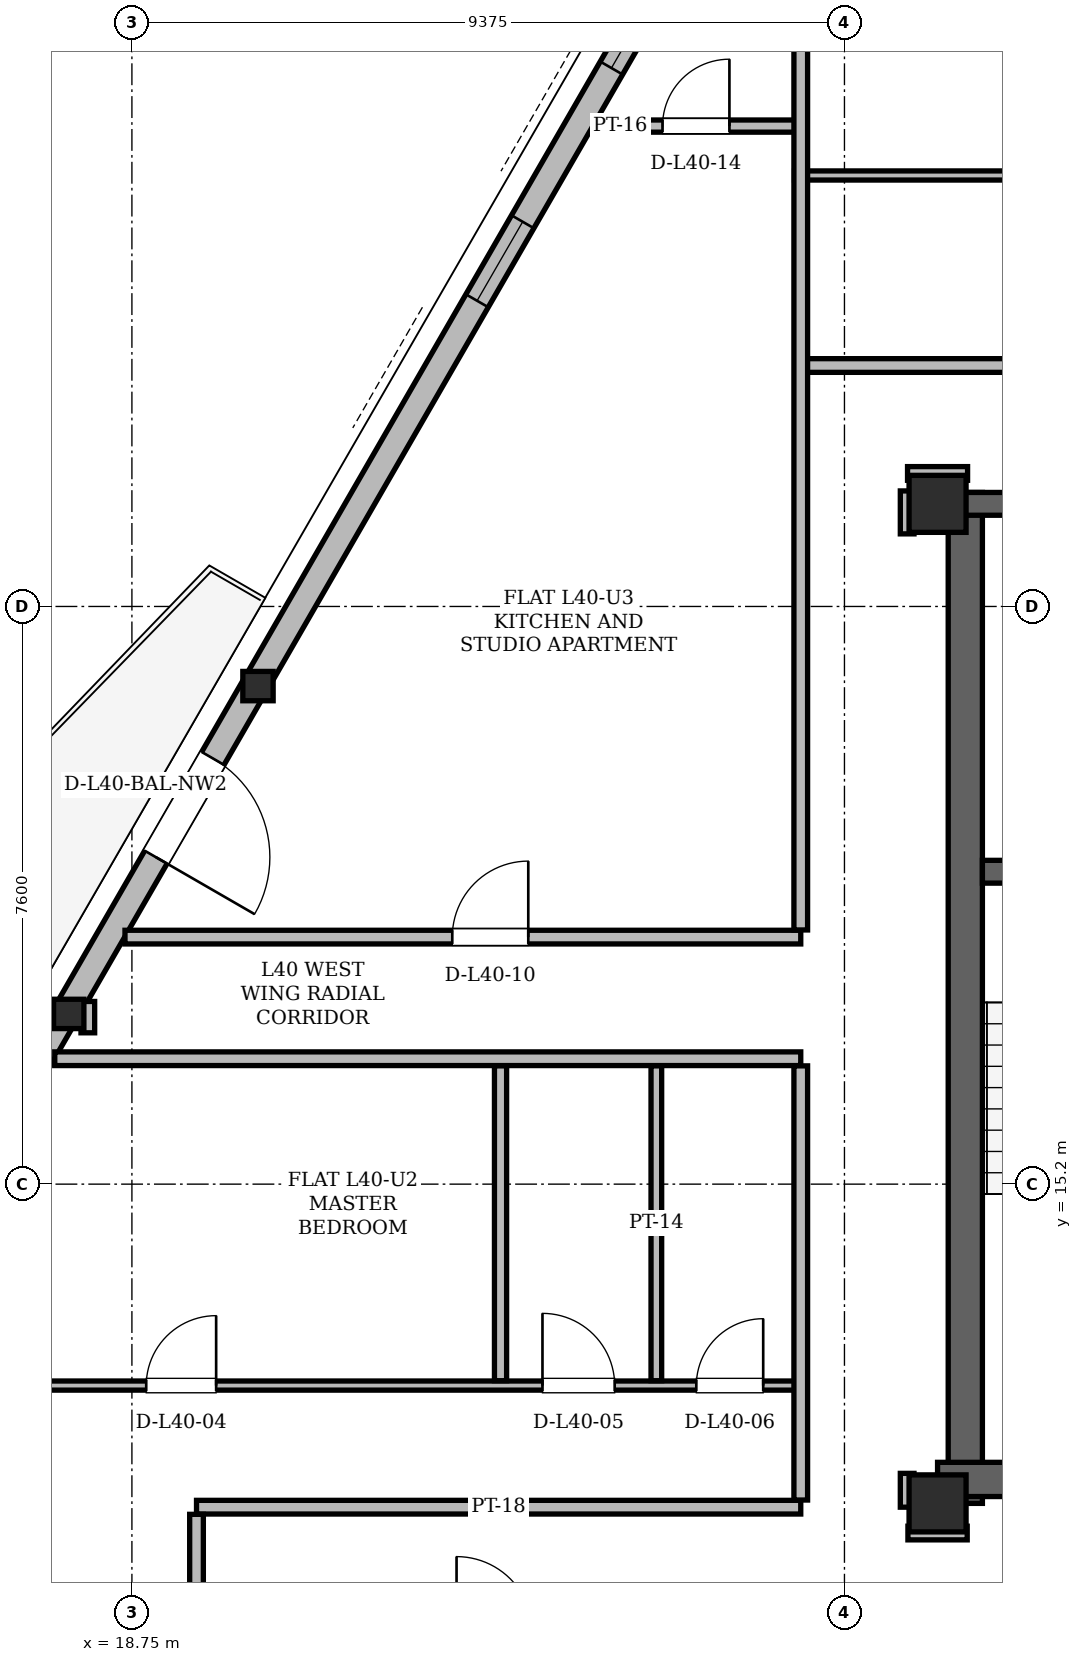
"""IFC4 building model, lengths in metres.
Left out: names, types, materials, properties, quantities, classifications, styles, units other than length and angle.
Written with IfcOpenShell. Run it as: python <this file> out.ifc"""

import sys

from ifc_helpers import new_model, si_unit, direction, frame, frame_2d, origin, origin_2d, place, context, subcontext, project, spatial, rectangle, hollow_rectangle, i_section, extrude, element, fill, save


model = new_model("IFC4")
c1 = context("Model", 3, precision=1e-05, world=origin(), true_north=direction((0.0, 1.0)))
c2 = subcontext(c1, "Body", "Model", "MODEL_VIEW")
j1 = project(units=[si_unit("LENGTHUNIT", "METRE"), si_unit("PLANEANGLEUNIT", "RADIAN")], contexts=[c1])
p1 = place(None, origin())
s1 = spatial("IfcSite", under=j1, at=p1, CompositionType="ELEMENT")
p2 = place(p1, origin())
s2 = spatial("IfcBuilding", under=s1, at=p2, CompositionType="ELEMENT")
p3 = place(p2, frame((0.0, 0.0, 153.0)))
s3 = spatial("IfcBuildingStorey", under=s2, at=p3, CompositionType="ELEMENT", Elevation=153.0)
for number, where, z_axis, x_axis in (
    (1, (29.35, 11.0, 0.0), (0.0, 0.0, 1.0), (1.0, 0.0, 0.0)),
    (2, (29.35, 24.15, 0.0), (0.0, 0.0, 1.0), (1.0, 0.0, 0.0)),
):
    element("IfcColumn", number, at=place(p3, frame(where, z_axis=z_axis, x_axis=x_axis)), inside=s3, PredefinedType="COLUMN", context=c2, shape_type="SweptSolid", body=[
        extrude(hollow_rectangle(XDim=0.75, YDim=0.75, WallThickness=0.06, at=origin_2d()), origin(), (0.0, 0.0, 1.0), 3.6),
    ])
p4 = place(p3, frame((20.379, 21.777, 0.004), z_axis=(0.016652541963, -0.013933759602, 0.999764243804), x_axis=(0.641722632674, 0.766936804903, 0.0)))
e3 = element("IfcColumn", 3, at=p4, inside=s3, PredefinedType="COLUMN", context=c2, shape_type="SweptSolid", body=[
    extrude(i_section(OverallWidth=0.399, OverallDepth=0.386, WebThickness=0.021, FlangeThickness=0.033, at=origin_2d()), origin(), (0.0, 0.0, 1.0), 3.592),
])
p5 = place(p3, frame((17.891, 17.469, 0.004), z_axis=(0.015360919156, -0.016176543182, 0.999751149843), x_axis=(0.725151558483, 0.68858929503, 0.0)))
e4 = element("IfcColumn", 4, at=p5, inside=s3, PredefinedType="COLUMN", context=c2, shape_type="SweptSolid", body=[
    extrude(i_section(OverallWidth=0.399, OverallDepth=0.386, WebThickness=0.021, FlangeThickness=0.033, at=origin_2d()), origin(), (0.0, 0.0, 1.0), 3.592),
])
p6 = place(p3, frame((29.715, 11.0, 0.0), z_axis=(0.0, 0.0, 1.0), x_axis=(0.0, 1.0, 0.0)))
e5 = element("IfcWall", 5, at=p6, inside=s3, PredefinedType="SHEAR", context=c2, shape_type="SweptSolid", body=[
    extrude(rectangle(XDim=13.3, YDim=0.45, at=frame_2d((6.65, 0.0))), origin(), (0.0, 0.0, 1.0), 3.38),
])
p7 = place(p3, frame((29.35, 11.315, 0.0), z_axis=(0.0, 0.0, 1.0), x_axis=(1.0, 0.0, 0.0)))
e6 = element("IfcWall", 6, at=p7, inside=s3, PredefinedType="SHEAR", context=c2, shape_type="SweptSolid", body=[
    extrude(rectangle(XDim=7.1, YDim=0.45, at=frame_2d((3.55, 0.0))), origin(), (0.0, 0.0, 1.0), 3.38),
])
p8 = place(p3, frame((29.65, 24.15, 0.0), z_axis=(0.0, 0.0, 1.0), x_axis=(1.0, 0.0, 0.0)))
e7 = element("IfcWall", 7, at=p8, inside=s3, PredefinedType="SHEAR", context=c2, shape_type="SweptSolid", body=[
    extrude(rectangle(XDim=15.7, YDim=0.3, at=frame_2d((7.85, 0.0))), origin(), (0.0, 0.0, 1.0), 3.38),
])
p9 = place(p8, frame((1.7, 0.0, 0.0)))
e8 = element("IfcOpeningElement", 8, at=p9, cuts=e7, PredefinedType="OPENING", context=c2, shape_type="SweptSolid", body=[
    extrude(rectangle(XDim=1.2, YDim=2.2, at=frame_2d((0.6, 1.1))), frame((0.0, 0.15, 0.0), z_axis=(0.0, -1.0, 0.0), x_axis=(1.0, 0.0, 0.0)), (0.0, 0.0, 1.0), 0.3),
])
p10 = place(p8, frame((12.8, 0.0, 0.0)))
e9 = element("IfcOpeningElement", 9, at=p10, cuts=e7, PredefinedType="OPENING", context=c2, shape_type="SweptSolid", body=[
    extrude(rectangle(XDim=1.2, YDim=2.2, at=frame_2d((0.6, 1.1))), frame((0.0, 0.15, 0.0), z_axis=(0.0, -1.0, 0.0), x_axis=(1.0, 0.0, 0.0)), (0.0, 0.0, 1.0), 0.3),
])
p11 = place(p8, frame((6.55, 0.0, 0.0)))
e10 = element("IfcOpeningElement", 10, at=p11, cuts=e7, PredefinedType="OPENING", context=c2, shape_type="SweptSolid", body=[
    extrude(rectangle(XDim=0.9, YDim=2.05, at=frame_2d((0.45, 1.025))), frame((0.0, 0.15, 0.0), z_axis=(0.0, -1.0, 0.0), x_axis=(1.0, 0.0, 0.0)), (0.0, 0.0, 1.0), 0.3),
])
p12 = place(p8, frame((8.45, 0.0, 0.0)))
e11 = element("IfcOpeningElement", 11, at=p12, cuts=e7, PredefinedType="OPENING", context=c2, shape_type="SweptSolid", body=[
    extrude(rectangle(XDim=0.9, YDim=2.05, at=frame_2d((0.45, 1.025))), frame((0.0, 0.15, 0.0), z_axis=(0.0, -1.0, 0.0), x_axis=(1.0, 0.0, 0.0)), (0.0, 0.0, 1.0), 0.3),
])
p13 = place(p3, frame((29.94, 19.31, 0.0), z_axis=(0.0, 0.0, 1.0), x_axis=(1.0, 0.0, 0.0)))
e12 = element("IfcWall", 12, at=p13, inside=s3, PredefinedType="SHEAR", context=c2, shape_type="SweptSolid", body=[
    extrude(rectangle(XDim=4.01, YDim=0.3, at=frame_2d((2.005, 0.0))), origin(), (0.0, 0.0, 1.0), 3.38),
])
p14 = place(p13, frame((1.01, 0.0, 0.0)))
e13 = element("IfcOpeningElement", 13, at=p14, cuts=e12, PredefinedType="OPENING", context=c2, shape_type="SweptSolid", body=[
    extrude(rectangle(XDim=1.4, YDim=2.2, at=frame_2d((0.7, 1.1))), frame((0.0, 0.15, 0.0), z_axis=(0.0, -1.0, 0.0), x_axis=(1.0, 0.0, 0.0)), (0.0, 0.0, 1.0), 0.3),
])
p15 = place(p3, frame((15.048, 12.544, 0.0), z_axis=(0.0, 0.0, 1.0), x_axis=(0.499991763293, -0.866030159197, 0.0)))
e14 = element("IfcWall", 14, at=p15, inside=s3, PredefinedType="SOLIDWALL", context=c2, shape_type="SweptSolid", body=[
    extrude(rectangle(XDim=9.365, YDim=0.34, at=frame_2d((4.682, 0.0))), origin(), (0.0, 0.0, 1.0), 2.6),
])
p16 = place(p3, frame((32.818, 43.322, 0.0), z_axis=(0.0, 0.0, 1.0), x_axis=(-0.500000946011, -0.866024857604, 0.0)))
e15 = element("IfcWall", 15, at=p16, inside=s3, PredefinedType="SOLIDWALL", context=c2, shape_type="SweptSolid", body=[
    extrude(rectangle(XDim=35.54, YDim=0.34, at=frame_2d((17.77, 0.0))), origin(), (0.0, 0.0, 1.0), 2.6),
])
p17 = place(p16, frame((6.579, 0.0, 0.0)))
e16 = element("IfcOpeningElement", 16, at=p17, cuts=e15, PredefinedType="OPENING", context=c2, shape_type="SweptSolid", body=[
    extrude(rectangle(XDim=1.5, YDim=2.2, at=frame_2d((0.75, 1.1))), frame((0.0, 0.17, 0.0), z_axis=(0.0, -1.0, 0.0), x_axis=(1.0, 0.0, 0.0)), (0.0, 0.0, 1.0), 0.34),
])
p18 = place(p16, frame((26.005, 0.0, 0.0)))
e17 = element("IfcOpeningElement", 17, at=p18, cuts=e15, PredefinedType="OPENING", context=c2, shape_type="SweptSolid", body=[
    extrude(rectangle(XDim=1.5, YDim=2.2, at=frame_2d((0.75, 1.1))), frame((0.0, 0.17, 0.0), z_axis=(0.0, -1.0, 0.0), x_axis=(1.0, 0.0, 0.0)), (0.0, 0.0, 1.0), 0.34),
])
p19 = place(p16, frame((33.049, 0.0, 0.85)))
e18 = element("IfcOpeningElement", 18, at=p19, cuts=e15, PredefinedType="OPENING", context=c2, shape_type="SweptSolid", body=[
    extrude(rectangle(XDim=1.2, YDim=1.48, at=frame_2d((0.6, 0.74))), frame((0.0, 0.17, 0.0), z_axis=(0.0, -1.0, 0.0), x_axis=(1.0, 0.0, 0.0)), (0.0, 0.0, 1.0), 0.34),
])
p20 = place(p16, frame((17.853, 0.0, 0.85)))
e19 = element("IfcOpeningElement", 19, at=p20, cuts=e15, PredefinedType="OPENING", context=c2, shape_type="SweptSolid", body=[
    extrude(rectangle(XDim=1.2, YDim=1.48, at=frame_2d((0.6, 0.74))), frame((0.0, 0.17, 0.0), z_axis=(0.0, -1.0, 0.0), x_axis=(1.0, 0.0, 0.0)), (0.0, 0.0, 1.0), 0.34),
])
p21 = place(p16, frame((11.661, 0.0, 0.85)))
e20 = element("IfcOpeningElement", 20, at=p21, cuts=e15, PredefinedType="OPENING", context=c2, shape_type="SweptSolid", body=[
    extrude(rectangle(XDim=1.2, YDim=1.48, at=frame_2d((0.6, 0.74))), frame((0.0, 0.17, 0.0), z_axis=(0.0, -1.0, 0.0), x_axis=(1.0, 0.0, 0.0)), (0.0, 0.0, 1.0), 0.34),
])
p22 = place(p16, frame((14.317, 0.0, 0.85)))
e21 = element("IfcOpeningElement", 21, at=p22, cuts=e15, PredefinedType="OPENING", context=c2, shape_type="SweptSolid", body=[
    extrude(rectangle(XDim=1.2, YDim=1.48, at=frame_2d((0.6, 0.74))), frame((0.0, 0.17, 0.0), z_axis=(0.0, -1.0, 0.0), x_axis=(1.0, 0.0, 0.0)), (0.0, 0.0, 1.0), 0.34),
])
p23 = place(p16, frame((2.865, 0.0, 0.85)))
e22 = element("IfcOpeningElement", 22, at=p23, cuts=e15, PredefinedType="OPENING", context=c2, shape_type="SweptSolid", body=[
    extrude(rectangle(XDim=1.6, YDim=1.64, at=frame_2d((0.8, 0.82))), frame((0.0, 0.17, 0.0), z_axis=(0.0, -1.0, 0.0), x_axis=(1.0, 0.0, 0.0)), (0.0, 0.0, 1.0), 0.34),
])
p24 = place(p3, frame((28.96, 10.61, 0.0), z_axis=(0.0, 0.0, 1.0), x_axis=(1.0, 0.0, 0.0)))
e23 = element("IfcWall", 23, at=p24, inside=s3, PredefinedType="PARTITIONING", context=c2, shape_type="SweptSolid", body=[
    extrude(rectangle(XDim=0.78, YDim=0.18, at=frame_2d((0.39, 0.0))), origin(), (0.0, 0.0, 1.0), 3.38),
])
p25 = place(p3, frame((19.6, 10.95, 0.0), z_axis=(0.0, 0.0, 1.0), x_axis=(1.0, 0.0, 0.0)))
e24 = element("IfcWall", 24, at=p25, inside=s3, PredefinedType="PARTITIONING", context=c2, shape_type="SweptSolid", body=[
    extrude(rectangle(XDim=7.95, YDim=0.18, at=frame_2d((3.975, 0.0))), origin(), (0.0, 0.0, 1.0), 3.38),
])
p26 = place(p3, frame((15.438, 12.55, 0.0), z_axis=(0.0, 0.0, 1.0), x_axis=(1.0, 0.0, 0.0)))
e25 = element("IfcWall", 25, at=p26, inside=s3, PredefinedType="PARTITIONING", context=c2, shape_type="SweptSolid", body=[
    extrude(rectangle(XDim=12.162, YDim=0.12, at=frame_2d((6.081, 0.0))), origin(), (0.0, 0.0, 1.0), 3.38),
])
p27 = place(p26, frame((3.5, 0.0, 0.0)))
e26 = element("IfcOpeningElement", 26, at=p27, cuts=e25, PredefinedType="OPENING", context=c2, shape_type="SweptSolid", body=[
    extrude(rectangle(XDim=0.92, YDim=2.12, at=frame_2d((0.46, 1.06))), frame((0.0, 0.06, 0.0), z_axis=(0.0, -1.0, 0.0), x_axis=(1.0, 0.0, 0.0)), (0.0, 0.0, 1.0), 0.12),
])
p28 = place(p26, frame((8.714, 0.0, 0.0)))
e27 = element("IfcOpeningElement", 27, at=p28, cuts=e25, PredefinedType="OPENING", context=c2, shape_type="SweptSolid", body=[
    extrude(rectangle(XDim=0.95, YDim=2.1, at=frame_2d((0.475, 1.05))), frame((0.0, 0.06, 0.0), z_axis=(0.0, -1.0, 0.0), x_axis=(1.0, 0.0, 0.0)), (0.0, 0.0, 1.0), 0.12),
])
p29 = place(p26, frame((10.738, 0.0, 0.0)))
e28 = element("IfcOpeningElement", 28, at=p29, cuts=e25, PredefinedType="OPENING", context=c2, shape_type="SweptSolid", body=[
    extrude(rectangle(XDim=0.88, YDim=2.08, at=frame_2d((0.44, 1.04))), frame((0.0, 0.06, 0.0), z_axis=(0.0, -1.0, 0.0), x_axis=(1.0, 0.0, 0.0)), (0.0, 0.0, 1.0), 0.12),
])
p30 = place(p3, frame((17.735, 16.85, 0.0), z_axis=(0.0, 0.0, 1.0), x_axis=(1.0, 0.0, 0.0)))
e29 = element("IfcWall", 29, at=p30, inside=s3, PredefinedType="PARTITIONING", context=c2, shape_type="SweptSolid", body=[
    extrude(rectangle(XDim=9.815, YDim=0.18, at=frame_2d((4.907, 0.0))), origin(), (0.0, 0.0, 1.0), 3.38),
])
p31 = place(p3, frame((18.659, 18.45, 0.0), z_axis=(0.0, 0.0, 1.0), x_axis=(1.0, 0.0, 0.0)))
e30 = element("IfcWall", 30, at=p31, inside=s3, PredefinedType="PARTITIONING", context=c2, shape_type="SweptSolid", body=[
    extrude(rectangle(XDim=8.891, YDim=0.18, at=frame_2d((4.446, 0.0))), origin(), (0.0, 0.0, 1.0), 3.38),
])
p32 = place(p31, frame((4.306, 0.0, 0.0)))
e31 = element("IfcOpeningElement", 31, at=p32, cuts=e30, PredefinedType="OPENING", context=c2, shape_type="SweptSolid", body=[
    extrude(rectangle(XDim=1.0, YDim=2.18, at=frame_2d((0.5, 1.09))), frame((0.0, 0.09, 0.0), z_axis=(0.0, -1.0, 0.0), x_axis=(1.0, 0.0, 0.0)), (0.0, 0.0, 1.0), 0.18),
])
p33 = place(p3, frame((28.955, 24.55, 0.0), z_axis=(0.0, 0.0, 1.0), x_axis=(1.0, 0.0, 0.0)))
e32 = element("IfcWall", 32, at=p33, inside=s3, PredefinedType="PARTITIONING", context=c2, shape_type="SweptSolid", body=[
    extrude(rectangle(XDim=0.79, YDim=0.18, at=frame_2d((0.395, 0.0))), origin(), (0.0, 0.0, 1.0), 2.842),
])
p34 = place(p3, frame((27.55, 25.97, 0.0), z_axis=(0.0, 0.0, 1.0), x_axis=(1.0, 0.0, 0.0)))
e33 = element("IfcWall", 33, at=p34, inside=s3, PredefinedType="PARTITIONING", context=c2, shape_type="SweptSolid", body=[
    extrude(rectangle(XDim=9.15, YDim=0.18, at=frame_2d((4.575, 0.0))), origin(), (0.0, 0.0, 1.0), 2.842),
])
p35 = place(p3, frame((27.468, 28.47, 0.0), z_axis=(0.0, 0.0, 1.0), x_axis=(1.0, 0.0, 0.0)))
e34 = element("IfcWall", 34, at=p35, inside=s3, PredefinedType="PARTITIONING", context=c2, shape_type="SweptSolid", body=[
    extrude(rectangle(XDim=9.314, YDim=0.12, at=frame_2d((4.657, 0.0))), origin(), (0.0, 0.0, 1.0), 3.38),
])
p36 = place(p35, frame((4.217, 0.0, 0.0)))
e35 = element("IfcOpeningElement", 35, at=p36, cuts=e34, PredefinedType="OPENING", context=c2, shape_type="SweptSolid", body=[
    extrude(rectangle(XDim=0.88, YDim=2.08, at=frame_2d((0.44, 1.04))), frame((0.0, 0.06, 0.0), z_axis=(0.0, -1.0, 0.0), x_axis=(1.0, 0.0, 0.0)), (0.0, 0.0, 1.0), 0.12),
])
p37 = place(p3, frame((24.819, 29.12, 0.0), z_axis=(0.0, 0.0, 1.0), x_axis=(1.0, 0.0, 0.0)))
e36 = element("IfcWall", 36, at=p37, inside=s3, PredefinedType="PARTITIONING", context=c2, shape_type="SweptSolid", body=[
    extrude(rectangle(XDim=2.813, YDim=0.16, at=frame_2d((1.406, 0.0))), origin(), (0.0, 0.0, 1.0), 3.38),
])
p38 = place(p37, frame((0.912, 0.0, 0.0)))
e37 = element("IfcOpeningElement", 37, at=p38, cuts=e36, PredefinedType="OPENING", context=c2, shape_type="SweptSolid", body=[
    extrude(rectangle(XDim=0.88, YDim=2.08, at=frame_2d((0.44, 1.04))), frame((0.0, 0.08, 0.0), z_axis=(0.0, -1.0, 0.0), x_axis=(1.0, 0.0, 0.0)), (0.0, 0.0, 1.0), 0.16),
])
p39 = place(p3, frame((18.17, 17.191, 0.0), z_axis=(0.0, 0.0, 1.0), x_axis=(0.0, 1.0, 0.0)))
e38 = element("IfcWall", 38, at=p39, inside=s3, PredefinedType="PARTITIONING", context=c2, shape_type="SweptSolid", body=[
    extrude(rectangle(XDim=0.413, YDim=0.18, at=frame_2d((0.206, 0.0))), origin(), (0.0, 0.0, 1.0), 3.38),
])
p40 = place(p3, frame((19.6, 9.394, 0.0), z_axis=(0.0, 0.0, 1.0), x_axis=(0.0, 1.0, 0.0)))
e39 = element("IfcWall", 39, at=p40, inside=s3, PredefinedType="PARTITIONING", context=c2, shape_type="SweptSolid", body=[
    extrude(rectangle(XDim=1.462, YDim=0.18, at=frame_2d((0.731, 0.0))), origin(), (0.0, 0.0, 1.0), 3.38),
])
p41 = place(p3, frame((23.6, 12.614, 0.0), z_axis=(0.0, 0.0, 1.0), x_axis=(0.0, 1.0, 0.0)))
e40 = element("IfcWall", 40, at=p41, inside=s3, PredefinedType="PARTITIONING", context=c2, shape_type="SweptSolid", body=[
    extrude(rectangle(XDim=4.142, YDim=0.16, at=frame_2d((2.071, 0.0))), origin(), (0.0, 0.0, 1.0), 3.38),
])
p42 = place(p3, frame((25.65, 12.614, 0.0), z_axis=(0.0, 0.0, 1.0), x_axis=(0.0, 1.0, 0.0)))
e41 = element("IfcWall", 41, at=p42, inside=s3, PredefinedType="PARTITIONING", context=c2, shape_type="SweptSolid", body=[
    extrude(rectangle(XDim=4.142, YDim=0.14, at=frame_2d((2.071, 0.0))), origin(), (0.0, 0.0, 1.0), 3.38),
])
p43 = place(p3, frame((27.55, 11.044, 0.0), z_axis=(0.0, 0.0, 1.0), x_axis=(0.0, 1.0, 0.0)))
e42 = element("IfcWall", 42, at=p43, inside=s3, PredefinedType="PARTITIONING", context=c2, shape_type="SweptSolid", body=[
    extrude(rectangle(XDim=5.712, YDim=0.18, at=frame_2d((2.856, 0.0))), origin(), (0.0, 0.0, 1.0), 2.842),
])
p44 = place(p3, frame((27.55, 18.544, 0.0), z_axis=(0.0, 0.0, 1.0), x_axis=(0.0, 1.0, 0.0)))
e43 = element("IfcWall", 43, at=p44, inside=s3, PredefinedType="PARTITIONING", context=c2, shape_type="SweptSolid", body=[
    extrude(rectangle(XDim=15.306, YDim=0.18, at=frame_2d((7.653, 0.0))), origin(), (0.0, 0.0, 1.0), 3.38),
])
p45 = place(p3, frame((28.95, 10.95, 0.0), z_axis=(0.0, 0.0, 1.0), x_axis=(0.0, 1.0, 0.0)))
e44 = element("IfcWall", 44, at=p45, inside=s3, PredefinedType="PARTITIONING", context=c2, shape_type="SweptSolid", body=[
    extrude(rectangle(XDim=0.445, YDim=0.18, at=frame_2d((0.223, 0.0))), origin(), (0.0, 0.0, 1.0), 2.842),
])
p46 = place(p3, frame((28.95, 23.755, 0.0), z_axis=(0.0, 0.0, 1.0), x_axis=(0.0, 1.0, 0.0)))
e45 = element("IfcWall", 45, at=p46, inside=s3, PredefinedType="PARTITIONING", context=c2, shape_type="SweptSolid", body=[
    extrude(rectangle(XDim=0.565, YDim=0.18, at=frame_2d((0.283, 0.0))), origin(), (0.0, 0.0, 1.0), 3.38),
])
p47 = place(p18, origin())
e46 = element("IfcDoor", 46, at=p47, inside=s3, OperationType="SINGLE_SWING_RIGHT", PredefinedType="DOOR", context=c2, shape_type="SweptSolid", body=[
    extrude(rectangle(XDim=1.5, YDim=2.2, at=frame_2d((0.75, 1.1))), frame((0.0, 0.025, 0.0), z_axis=(0.0, -1.0, 0.0), x_axis=(1.0, 0.0, 0.0)), (0.0, 0.0, 1.0), 0.05),
])
fill(e17, e46)
p48 = place(p20, origin())
e47 = element("IfcWindow", 47, at=p48, inside=s3, PartitioningType="SINGLE_PANEL", PredefinedType="WINDOW", context=c2, shape_type="SweptSolid", body=[
    extrude(rectangle(XDim=1.2, YDim=1.48, at=frame_2d((0.6, 0.74))), frame((0.0, 0.03, 0.0), z_axis=(0.0, -1.0, 0.0), x_axis=(1.0, 0.0, 0.0)), (0.0, 0.0, 1.0), 0.06),
])
fill(e19, e47)
p49 = place(p22, origin())
e48 = element("IfcWindow", 48, at=p49, inside=s3, PartitioningType="SINGLE_PANEL", PredefinedType="WINDOW", context=c2, shape_type="SweptSolid", body=[
    extrude(rectangle(XDim=1.2, YDim=1.48, at=frame_2d((0.6, 0.74))), frame((0.0, 0.03, 0.0), z_axis=(0.0, -1.0, 0.0), x_axis=(1.0, 0.0, 0.0)), (0.0, 0.0, 1.0), 0.06),
])
fill(e21, e48)
p50 = place(p27, origin())
e49 = element("IfcDoor", 49, at=p50, inside=s3, OperationType="SINGLE_SWING_RIGHT", PredefinedType="DOOR", context=c2, shape_type="SweptSolid", body=[
    extrude(rectangle(XDim=0.92, YDim=2.12, at=frame_2d((0.46, 1.06))), frame((0.0, 0.025, 0.0), z_axis=(0.0, -1.0, 0.0), x_axis=(1.0, 0.0, 0.0)), (0.0, 0.0, 1.0), 0.05),
])
fill(e26, e49)
p51 = place(p28, origin())
e50 = element("IfcDoor", 50, at=p51, inside=s3, OperationType="SINGLE_SWING_LEFT", PredefinedType="DOOR", context=c2, shape_type="SweptSolid", body=[
    extrude(rectangle(XDim=0.95, YDim=2.1, at=frame_2d((0.475, 1.05))), frame((0.0, 0.025, 0.0), z_axis=(0.0, -1.0, 0.0), x_axis=(1.0, 0.0, 0.0)), (0.0, 0.0, 1.0), 0.05),
])
fill(e27, e50)
p52 = place(p29, origin())
e51 = element("IfcDoor", 51, at=p52, inside=s3, OperationType="SINGLE_SWING_RIGHT", PredefinedType="DOOR", context=c2, shape_type="SweptSolid", body=[
    extrude(rectangle(XDim=0.88, YDim=2.08, at=frame_2d((0.44, 1.04))), frame((0.0, 0.025, 0.0), z_axis=(0.0, -1.0, 0.0), x_axis=(1.0, 0.0, 0.0)), (0.0, 0.0, 1.0), 0.05),
])
fill(e28, e51)
p53 = place(p32, origin())
e52 = element("IfcDoor", 52, at=p53, inside=s3, OperationType="SINGLE_SWING_RIGHT", PredefinedType="DOOR", context=c2, shape_type="SweptSolid", body=[
    extrude(rectangle(XDim=1.0, YDim=2.18, at=frame_2d((0.5, 1.09))), frame((0.0, 0.025, 0.0), z_axis=(0.0, -1.0, 0.0), x_axis=(1.0, 0.0, 0.0)), (0.0, 0.0, 1.0), 0.05),
])
fill(e31, e52)
p54 = place(p38, origin())
e53 = element("IfcDoor", 53, at=p54, inside=s3, OperationType="SINGLE_SWING_RIGHT", PredefinedType="DOOR", context=c2, shape_type="SweptSolid", body=[
    extrude(rectangle(XDim=0.88, YDim=2.08, at=frame_2d((0.44, 1.04))), frame((0.0, 0.025, 0.0), z_axis=(0.0, -1.0, 0.0), x_axis=(1.0, 0.0, 0.0)), (0.0, 0.0, 1.0), 0.05),
])
fill(e37, e53)
save(model, sys.argv[1])
